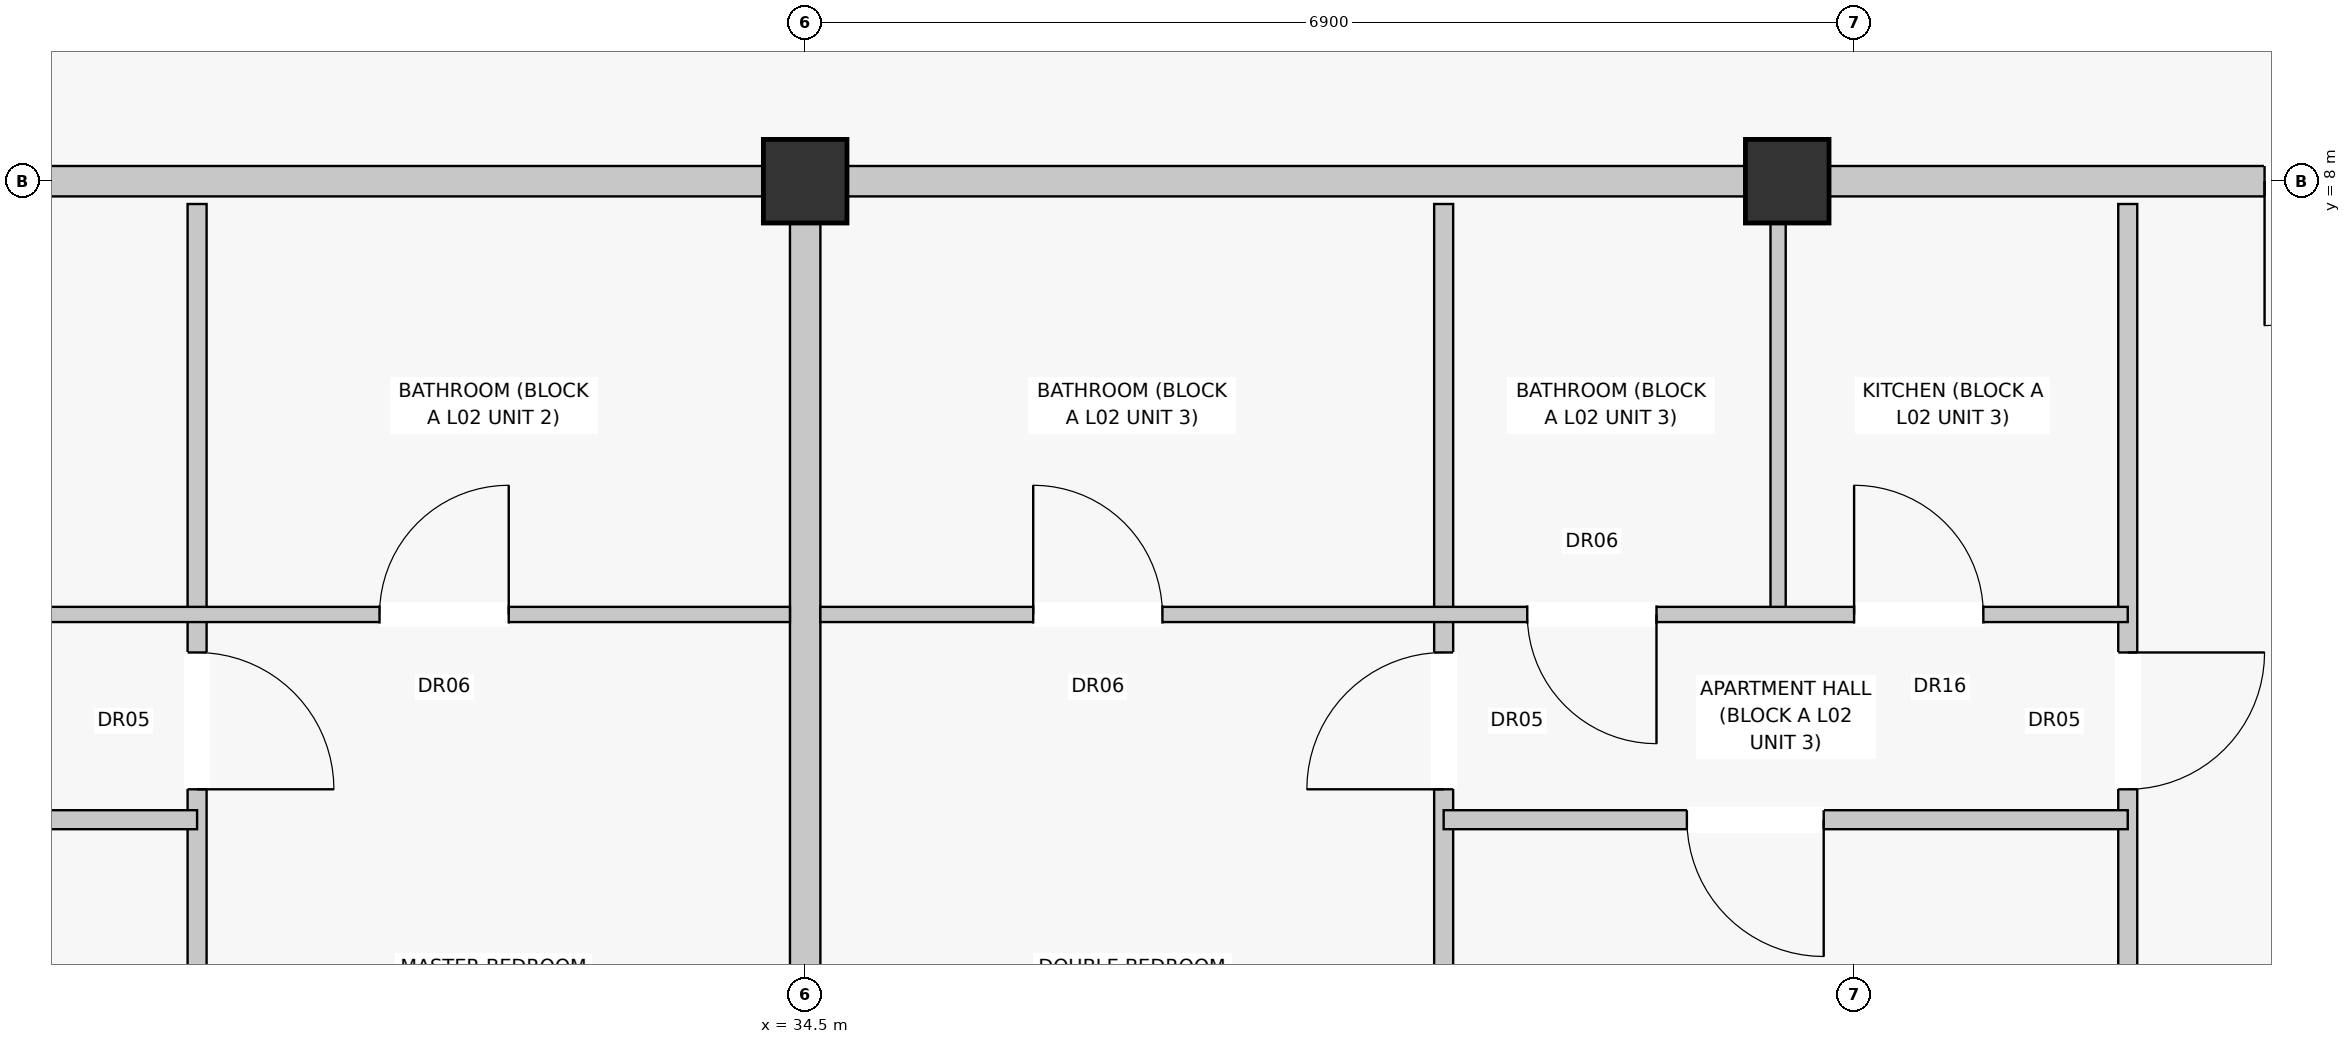
"""IFC4 building model, lengths in metres.
Left out: names, types, materials, properties, quantities, classifications, styles, units other than length and angle.
Written with IfcOpenShell. Run it as: python <this file> out.ifc"""

import sys

from ifc_helpers import new_model, si_unit, direction, frame, frame_2d, origin, origin_with_axes, origin_2d, place, context, subcontext, project, spatial, rectangle, extrude, element, fill, save


model = new_model("IFC4")
c1 = context("Model", 3, precision=1e-05, world=origin(), true_north=direction((0.0, 1.0)))
c2 = subcontext(c1, "Body", "Model", "MODEL_VIEW")
j1 = project(units=[si_unit("LENGTHUNIT", "METRE"), si_unit("PLANEANGLEUNIT", "RADIAN")], contexts=[c1])
p1 = place(None, origin())
s1 = spatial("IfcSite", under=j1, at=p1, CompositionType="ELEMENT")
p2 = place(p1, origin())
s2 = spatial("IfcBuilding", under=s1, at=p2, CompositionType="ELEMENT")
p3 = place(p2, frame((0.0, 0.0, 8.0)))
s3 = spatial("IfcBuildingStorey", under=s2, at=p3, CompositionType="ELEMENT", Elevation=8.0)
for number, where, z_axis, x_axis in (
    (1, (34.5, 8.0, 0.0), (0.0, 0.0, 1.0), (1.0, 0.0, 0.0)),
    (2, (40.96, 8.0, 0.0), (0.0, 0.0, 1.0), (1.0, 0.0, 0.0)),
):
    element("IfcColumn", number, at=place(p3, frame(where, z_axis=z_axis, x_axis=x_axis)), inside=s3, PredefinedType="COLUMN", context=c2, shape_type="SweptSolid", body=[
        extrude(rectangle(XDim=0.55, YDim=0.55, at=origin_2d()), origin(), (0.0, 0.0, 1.0), 3.2),
    ])
p4 = place(p3, frame((34.5, 7.85, 0.0), z_axis=(0.0, 0.0, 1.0), x_axis=(0.0, -1.0, 0.0)))
e3 = element("IfcWall", 3, at=p4, inside=s3, PredefinedType="PARTITIONING", context=c2, shape_type="SweptSolid", body=[
    extrude(rectangle(XDim=7.7, YDim=0.2, at=frame_2d((3.85, 0.0))), origin(), (0.0, 0.0, 1.0), 2.94),
])
p5 = place(p3, frame((13.8, 8.0, 0.0), z_axis=(0.0, 0.0, 1.0), x_axis=(1.0, 0.0, 0.0)))
e4 = element("IfcWall", 4, at=p5, inside=s3, PredefinedType="PARTITIONING", context=c2, shape_type="SweptSolid", body=[
    extrude(rectangle(XDim=20.7, YDim=0.2, at=frame_2d((10.35, 0.0))), origin(), (0.0, 0.0, 1.0), 2.38),
])
p6 = place(p5, frame((2.4, 0.0, 0.0)))
e5 = element("IfcOpeningElement", 5, at=p6, cuts=e4, PredefinedType="OPENING", context=c2, shape_type="SweptSolid", body=[
    extrude(rectangle(XDim=0.95, YDim=2.15, at=frame_2d((0.475, 1.075))), frame((0.0, 0.112, 0.0), z_axis=(0.0, -1.0, 0.0), x_axis=(1.0, 0.0, 0.0)), (0.0, 0.0, 1.0), 0.224),
])
p7 = place(p3, frame((30.5, 7.85, 0.0), z_axis=(0.0, 0.0, 1.0), x_axis=(0.0, -1.0, 0.0)))
e6 = element("IfcWall", 6, at=p7, inside=s3, PredefinedType="PARTITIONING", context=c2, shape_type="SweptSolid", body=[
    extrude(rectangle(XDim=7.65, YDim=0.125, at=frame_2d((3.825, 0.0))), origin(), (0.0, 0.0, 1.0), 2.94),
])
p8 = place(p7, frame((2.95, 0.0, 0.0)))
e7 = element("IfcOpeningElement", 7, at=p8, cuts=e6, PredefinedType="OPENING", context=c2, shape_type="SweptSolid", body=[
    extrude(rectangle(XDim=0.9, YDim=2.1, at=frame_2d((0.45, 1.05))), frame((0.0, 0.074, 0.0), z_axis=(0.0, -1.0, 0.0), x_axis=(1.0, 0.0, 0.0)), (0.0, 0.0, 1.0), 0.149),
])
p9 = place(p3, frame((20.1, 5.15, 0.0), z_axis=(0.0, 0.0, 1.0), x_axis=(1.0, 0.0, 0.0)))
e8 = element("IfcWall", 8, at=p9, inside=s3, PredefinedType="PARTITIONING", context=c2, shape_type="SweptSolid", body=[
    extrude(rectangle(XDim=14.3, YDim=0.1, at=frame_2d((7.15, 0.0))), origin(), (0.0, 0.0, 1.0), 2.94),
])
p10 = place(p9, frame((1.6, 0.0, 0.0)))
e9 = element("IfcOpeningElement", 9, at=p10, cuts=e8, PredefinedType="OPENING", context=c2, shape_type="SweptSolid", body=[
    extrude(rectangle(XDim=0.9, YDim=2.1, at=frame_2d((0.45, 1.05))), frame((0.0, 0.062, 0.0), z_axis=(0.0, -1.0, 0.0), x_axis=(1.0, 0.0, 0.0)), (0.0, 0.0, 1.0), 0.124),
])
p11 = place(p9, frame((5.1, 0.0, 0.0)))
e10 = element("IfcOpeningElement", 10, at=p11, cuts=e8, PredefinedType="OPENING", context=c2, shape_type="SweptSolid", body=[
    extrude(rectangle(XDim=0.85, YDim=2.05, at=frame_2d((0.425, 1.025))), frame((0.0, 0.062, 0.0), z_axis=(0.0, -1.0, 0.0), x_axis=(1.0, 0.0, 0.0)), (0.0, 0.0, 1.0), 0.124),
])
p12 = place(p9, frame((8.2, 0.0, 0.0)))
e11 = element("IfcOpeningElement", 11, at=p12, cuts=e8, PredefinedType="OPENING", context=c2, shape_type="SweptSolid", body=[
    extrude(rectangle(XDim=0.85, YDim=2.05, at=frame_2d((0.425, 1.025))), frame((0.0, 0.062, 0.0), z_axis=(0.0, -1.0, 0.0), x_axis=(1.0, 0.0, 0.0)), (0.0, 0.0, 1.0), 0.124),
])
p13 = place(p9, frame((11.6, 0.0, 0.0)))
e12 = element("IfcOpeningElement", 12, at=p13, cuts=e8, PredefinedType="OPENING", context=c2, shape_type="SweptSolid", body=[
    extrude(rectangle(XDim=0.85, YDim=2.05, at=frame_2d((0.425, 1.025))), frame((0.0, 0.062, 0.0), z_axis=(0.0, -1.0, 0.0), x_axis=(1.0, 0.0, 0.0)), (0.0, 0.0, 1.0), 0.124),
])
p14 = place(p3, frame((20.1, 3.8, 0.0), z_axis=(0.0, 0.0, 1.0), x_axis=(1.0, 0.0, 0.0)))
e13 = element("IfcWall", 13, at=p14, inside=s3, PredefinedType="PARTITIONING", context=c2, shape_type="SweptSolid", body=[
    extrude(rectangle(XDim=10.4, YDim=0.125, at=frame_2d((5.2, 0.0))), origin(), (0.0, 0.0, 1.0), 2.94),
])
p15 = place(p14, frame((2.0, 0.0, 0.0)))
e14 = element("IfcOpeningElement", 14, at=p15, cuts=e13, PredefinedType="OPENING", context=c2, shape_type="SweptSolid", body=[
    extrude(rectangle(XDim=0.9, YDim=2.1, at=frame_2d((0.45, 1.05))), frame((0.0, 0.074, 0.0), z_axis=(0.0, -1.0, 0.0), x_axis=(1.0, 0.0, 0.0)), (0.0, 0.0, 1.0), 0.149),
])
p16 = place(p14, frame((7.2, 0.0, 0.0)))
e15 = element("IfcOpeningElement", 15, at=p16, cuts=e13, PredefinedType="OPENING", context=c2, shape_type="SweptSolid", body=[
    extrude(rectangle(XDim=0.9, YDim=2.1, at=frame_2d((0.45, 1.05))), frame((0.0, 0.074, 0.0), z_axis=(0.0, -1.0, 0.0), x_axis=(1.0, 0.0, 0.0)), (0.0, 0.0, 1.0), 0.149),
])
p17 = place(p3, frame((34.5, 8.0, 0.0), z_axis=(0.0, 0.0, 1.0), x_axis=(1.0, 0.0, 0.0)))
e16 = element("IfcWall", 16, at=p17, inside=s3, PredefinedType="PARTITIONING", context=c2, shape_type="SweptSolid", body=[
    extrude(rectangle(XDim=13.8, YDim=0.2, at=frame_2d((6.9, 0.0))), origin(), (0.0, 0.0, 1.0), 2.38),
])
p18 = place(p17, frame((9.6, 0.0, 0.0)))
e17 = element("IfcOpeningElement", 17, at=p18, cuts=e16, PredefinedType="OPENING", context=c2, shape_type="SweptSolid", body=[
    extrude(rectangle(XDim=0.95, YDim=2.15, at=frame_2d((0.475, 1.075))), frame((0.0, 0.112, 0.0), z_axis=(0.0, -1.0, 0.0), x_axis=(1.0, 0.0, 0.0)), (0.0, 0.0, 1.0), 0.224),
])
p19 = place(p3, frame((43.2, 7.85, 0.0), z_axis=(0.0, 0.0, 1.0), x_axis=(0.0, -1.0, 0.0)))
e18 = element("IfcWall", 18, at=p19, inside=s3, PredefinedType="PARTITIONING", context=c2, shape_type="SweptSolid", body=[
    extrude(rectangle(XDim=7.65, YDim=0.125, at=frame_2d((3.825, 0.0))), origin(), (0.0, 0.0, 1.0), 2.59),
])
p20 = place(p19, frame((2.95, 0.0, 0.0)))
e19 = element("IfcOpeningElement", 19, at=p20, cuts=e18, PredefinedType="OPENING", context=c2, shape_type="SweptSolid", body=[
    extrude(rectangle(XDim=0.9, YDim=2.1, at=frame_2d((0.45, 1.05))), frame((0.0, 0.074, 0.0), z_axis=(0.0, -1.0, 0.0), x_axis=(1.0, 0.0, 0.0)), (0.0, 0.0, 1.0), 0.149),
])
p21 = place(p3, frame((38.7, 7.85, 0.0), z_axis=(0.0, 0.0, 1.0), x_axis=(0.0, -1.0, 0.0)))
e20 = element("IfcWall", 20, at=p21, inside=s3, PredefinedType="PARTITIONING", context=c2, shape_type="SweptSolid", body=[
    extrude(rectangle(XDim=7.65, YDim=0.125, at=frame_2d((3.825, 0.0))), origin(), (0.0, 0.0, 1.0), 2.94),
])
p22 = place(p21, frame((2.95, 0.0, 0.0)))
e21 = element("IfcOpeningElement", 21, at=p22, cuts=e20, PredefinedType="OPENING", context=c2, shape_type="SweptSolid", body=[
    extrude(rectangle(XDim=0.9, YDim=2.1, at=frame_2d((0.45, 1.05))), frame((0.0, 0.074, 0.0), z_axis=(0.0, -1.0, 0.0), x_axis=(1.0, 0.0, 0.0)), (0.0, 0.0, 1.0), 0.149),
])
p23 = place(p3, frame((40.9, 7.85, 0.0), z_axis=(0.0, 0.0, 1.0), x_axis=(0.0, -1.0, 0.0)))
e22 = element("IfcWall", 22, at=p23, inside=s3, PredefinedType="PARTITIONING", context=c2, shape_type="SweptSolid", body=[
    extrude(rectangle(XDim=2.7, YDim=0.1, at=frame_2d((1.35, 0.0))), origin(), (0.0, 0.0, 1.0), 2.94),
])
p24 = place(p3, frame((34.6, 5.15, 0.0), z_axis=(0.0, 0.0, 1.0), x_axis=(1.0, 0.0, 0.0)))
e23 = element("IfcWall", 23, at=p24, inside=s3, PredefinedType="PARTITIONING", context=c2, shape_type="SweptSolid", body=[
    extrude(rectangle(XDim=8.6, YDim=0.1, at=frame_2d((4.3, 0.0))), origin(), (0.0, 0.0, 1.0), 2.94),
])
p25 = place(p24, frame((1.4, 0.0, 0.0)))
e24 = element("IfcOpeningElement", 24, at=p25, cuts=e23, PredefinedType="OPENING", context=c2, shape_type="SweptSolid", body=[
    extrude(rectangle(XDim=0.85, YDim=2.05, at=frame_2d((0.425, 1.025))), frame((0.0, 0.062, 0.0), z_axis=(0.0, -1.0, 0.0), x_axis=(1.0, 0.0, 0.0)), (0.0, 0.0, 1.0), 0.124),
])
p26 = place(p24, frame((4.65, 0.0, 0.0)))
e25 = element("IfcOpeningElement", 25, at=p26, cuts=e23, PredefinedType="OPENING", context=c2, shape_type="SweptSolid", body=[
    extrude(rectangle(XDim=0.85, YDim=2.05, at=frame_2d((0.425, 1.025))), frame((0.0, 0.062, 0.0), z_axis=(0.0, -1.0, 0.0), x_axis=(1.0, 0.0, 0.0)), (0.0, 0.0, 1.0), 0.124),
])
p27 = place(p24, frame((6.8, 0.0, 0.0)))
e26 = element("IfcOpeningElement", 26, at=p27, cuts=e23, PredefinedType="OPENING", context=c2, shape_type="SweptSolid", body=[
    extrude(rectangle(XDim=0.85, YDim=2.1, at=frame_2d((0.425, 1.05))), frame((0.0, 0.062, 0.0), z_axis=(0.0, -1.0, 0.0), x_axis=(1.0, 0.0, 0.0)), (0.0, 0.0, 1.0), 0.124),
])
p28 = place(p3, frame((38.7, 3.8, 0.0), z_axis=(0.0, 0.0, 1.0), x_axis=(1.0, 0.0, 0.0)))
e27 = element("IfcWall", 27, at=p28, inside=s3, PredefinedType="PARTITIONING", context=c2, shape_type="SweptSolid", body=[
    extrude(rectangle(XDim=4.5, YDim=0.125, at=frame_2d((2.25, 0.0))), origin(), (0.0, 0.0, 1.0), 2.94),
])
p29 = place(p28, frame((1.6, 0.0, 0.0)))
e28 = element("IfcOpeningElement", 28, at=p29, cuts=e27, PredefinedType="OPENING", context=c2, shape_type="SweptSolid", body=[
    extrude(rectangle(XDim=0.9, YDim=2.1, at=frame_2d((0.45, 1.05))), frame((0.0, 0.074, 0.0), z_axis=(0.0, -1.0, 0.0), x_axis=(1.0, 0.0, 0.0)), (0.0, 0.0, 1.0), 0.149),
])
p30 = place(p8, origin_with_axes())
e29 = element("IfcDoor", 29, at=p30, inside=s3, OperationType="SINGLE_SWING_RIGHT", PredefinedType="DOOR", context=c2, shape_type="SweptSolid", body=[
    extrude(rectangle(XDim=0.9, YDim=2.1, at=frame_2d((0.45, 1.05))), frame((0.0, 0.025, 0.0), z_axis=(0.0, -1.0, 0.0), x_axis=(1.0, 0.0, 0.0)), (0.0, 0.0, 1.0), 0.05),
])
fill(e7, e29)
p31 = place(p13, origin_with_axes())
e30 = element("IfcDoor", 30, at=p31, inside=s3, OperationType="SINGLE_SWING_RIGHT", PredefinedType="DOOR", context=c2, shape_type="SweptSolid", body=[
    extrude(rectangle(XDim=0.85, YDim=2.05, at=frame_2d((0.425, 1.025))), frame((0.0, 0.025, 0.0), z_axis=(0.0, -1.0, 0.0), x_axis=(1.0, 0.0, 0.0)), (0.0, 0.0, 1.0), 0.05),
])
fill(e12, e30)
p32 = place(p18, frame((0.95, 0.0, 0.0), z_axis=(0.0, 0.0, 1.0), x_axis=(-1.0, 0.0, 0.0)))
e31 = element("IfcDoor", 31, at=p32, inside=s3, OperationType="SINGLE_SWING_LEFT", PredefinedType="DOOR", context=c2, shape_type="SweptSolid", body=[
    extrude(rectangle(XDim=0.95, YDim=2.15, at=frame_2d((0.475, 1.075))), frame((0.0, 0.025, 0.0), z_axis=(0.0, -1.0, 0.0), x_axis=(1.0, 0.0, 0.0)), (0.0, 0.0, 1.0), 0.05),
])
fill(e17, e31)
p33 = place(p20, origin_with_axes())
e32 = element("IfcDoor", 32, at=p33, inside=s3, OperationType="SINGLE_SWING_LEFT", PredefinedType="DOOR", context=c2, shape_type="SweptSolid", body=[
    extrude(rectangle(XDim=0.9, YDim=2.1, at=frame_2d((0.45, 1.05))), frame((0.0, 0.025, 0.0), z_axis=(0.0, -1.0, 0.0), x_axis=(1.0, 0.0, 0.0)), (0.0, 0.0, 1.0), 0.05),
])
fill(e19, e32)
p34 = place(p22, frame((0.9, 0.0, 0.0), z_axis=(0.0, 0.0, 1.0), x_axis=(-1.0, 0.0, 0.0)))
e33 = element("IfcDoor", 33, at=p34, inside=s3, OperationType="SINGLE_SWING_RIGHT", PredefinedType="DOOR", context=c2, shape_type="SweptSolid", body=[
    extrude(rectangle(XDim=0.9, YDim=2.1, at=frame_2d((0.45, 1.05))), frame((0.0, 0.025, 0.0), z_axis=(0.0, -1.0, 0.0), x_axis=(1.0, 0.0, 0.0)), (0.0, 0.0, 1.0), 0.05),
])
fill(e21, e33)
p35 = place(p25, origin_with_axes())
e34 = element("IfcDoor", 34, at=p35, inside=s3, OperationType="SINGLE_SWING_LEFT", PredefinedType="DOOR", context=c2, shape_type="SweptSolid", body=[
    extrude(rectangle(XDim=0.85, YDim=2.05, at=frame_2d((0.425, 1.025))), frame((0.0, 0.025, 0.0), z_axis=(0.0, -1.0, 0.0), x_axis=(1.0, 0.0, 0.0)), (0.0, 0.0, 1.0), 0.05),
])
fill(e24, e34)
p36 = place(p26, frame((0.85, 0.0, 0.0), z_axis=(0.0, 0.0, 1.0), x_axis=(-1.0, 0.0, 0.0)))
e35 = element("IfcDoor", 35, at=p36, inside=s3, OperationType="SINGLE_SWING_RIGHT", PredefinedType="DOOR", context=c2, shape_type="SweptSolid", body=[
    extrude(rectangle(XDim=0.85, YDim=2.05, at=frame_2d((0.425, 1.025))), frame((0.0, 0.025, 0.0), z_axis=(0.0, -1.0, 0.0), x_axis=(1.0, 0.0, 0.0)), (0.0, 0.0, 1.0), 0.05),
])
fill(e25, e35)
p37 = place(p27, origin_with_axes())
e36 = element("IfcDoor", 36, at=p37, inside=s3, OperationType="SINGLE_SWING_LEFT", PredefinedType="DOOR", context=c2, shape_type="SweptSolid", body=[
    extrude(rectangle(XDim=0.85, YDim=2.1, at=frame_2d((0.425, 1.05))), frame((0.0, 0.025, 0.0), z_axis=(0.0, -1.0, 0.0), x_axis=(1.0, 0.0, 0.0)), (0.0, 0.0, 1.0), 0.05),
])
fill(e26, e36)
p38 = place(p29, frame((0.9, 0.0, 0.0), z_axis=(0.0, 0.0, 1.0), x_axis=(-1.0, 0.0, 0.0)))
e37 = element("IfcDoor", 37, at=p38, inside=s3, OperationType="SINGLE_SWING_RIGHT", PredefinedType="DOOR", context=c2, shape_type="SweptSolid", body=[
    extrude(rectangle(XDim=0.9, YDim=2.1, at=frame_2d((0.45, 1.05))), frame((0.0, 0.025, 0.0), z_axis=(0.0, -1.0, 0.0), x_axis=(1.0, 0.0, 0.0)), (0.0, 0.0, 1.0), 0.05),
])
fill(e28, e37)
save(model, sys.argv[1])
